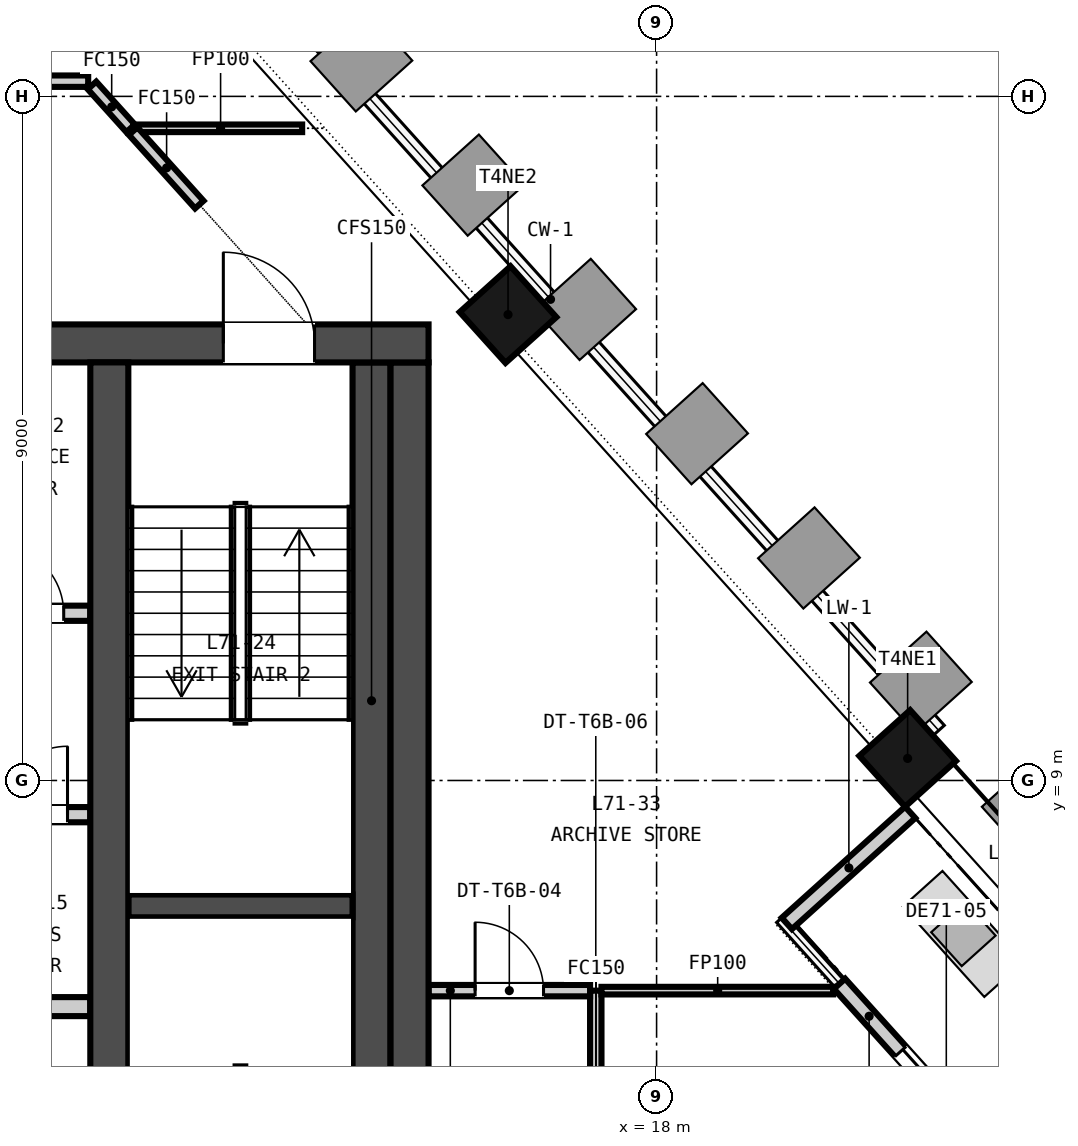
"""IFC4 building model, lengths in metres.
Left out: names, types, materials, properties, quantities, classifications, styles, units other than length and angle.
Written with IfcOpenShell. Run it as: python <this file> out.ifc"""

import sys

from ifc_helpers import new_model, si_unit, direction, frame, frame_2d, origin, origin_2d, place, context, subcontext, project, spatial, rectangle, extrude, element, fill, save


model = new_model("IFC4")
c1 = context("Model", 3, precision=1e-05, world=origin(), true_north=direction((0.0, 1.0)))
c2 = subcontext(c1, "Body", "Model", "MODEL_VIEW")
j1 = project(units=[si_unit("LENGTHUNIT", "METRE"), si_unit("PLANEANGLEUNIT", "RADIAN")], contexts=[c1])
p1 = place(None, origin())
s1 = spatial("IfcSite", under=j1, at=p1, CompositionType="ELEMENT")
p2 = place(p1, origin())
s2 = spatial("IfcBuilding", under=s1, at=p2, CompositionType="ELEMENT")
p3 = place(p2, frame((0.0, 0.0, 279.2)))
s3 = spatial("IfcBuildingStorey", under=s2, at=p3, CompositionType="ELEMENT", Elevation=279.2)
p4 = place(p3, frame((-15.0, 14.75, -0.15), z_axis=(0.0, 0.0, 1.0), x_axis=(1.0, 0.0, 0.0)))
e1 = element("IfcWall", 1, at=p4, inside=s3, PredefinedType="SOLIDWALL", context=c2, shape_type="SweptSolid", body=[
    extrude(rectangle(XDim=30.0, YDim=0.5, at=frame_2d((15.0, 0.0))), origin(), (0.0, 0.0, 1.0), 3.65),
])
p5 = place(p4, frame((9.25, 0.0, 0.15)))
e2 = element("IfcOpeningElement", 2, at=p5, cuts=e1, PredefinedType="OPENING", context=c2, shape_type="SweptSolid", body=[
    extrude(rectangle(XDim=1.5, YDim=2.1, at=frame_2d((0.75, 1.05))), frame((0.0, 0.26, 0.0), z_axis=(0.0, -1.0, 0.0), x_axis=(1.0, 0.0, 0.0)), (0.0, 0.0, 1.0), 0.52),
])
p6 = place(p4, frame((19.4, 0.0, 0.15)))
e3 = element("IfcOpeningElement", 3, at=p6, cuts=e1, PredefinedType="OPENING", context=c2, shape_type="SweptSolid", body=[
    extrude(rectangle(XDim=1.5, YDim=2.1, at=frame_2d((0.75, 1.05))), frame((0.0, 0.26, 0.0), z_axis=(0.0, -1.0, 0.0), x_axis=(1.0, 0.0, 0.0)), (0.0, 0.0, 1.0), 0.52),
])
p7 = place(p4, frame((1.5, 0.0, 0.15)))
e4 = element("IfcOpeningElement", 4, at=p7, cuts=e1, PredefinedType="OPENING", context=c2, shape_type="SweptSolid", body=[
    extrude(rectangle(XDim=1.2, YDim=2.1, at=frame_2d((0.6, 1.05))), frame((0.0, 0.26, 0.0), z_axis=(0.0, -1.0, 0.0), x_axis=(1.0, 0.0, 0.0)), (0.0, 0.0, 1.0), 0.52),
])
p8 = place(p4, frame((27.3, 0.0, 0.15)))
e5 = element("IfcOpeningElement", 5, at=p8, cuts=e1, PredefinedType="OPENING", context=c2, shape_type="SweptSolid", body=[
    extrude(rectangle(XDim=1.2, YDim=2.1, at=frame_2d((0.6, 1.05))), frame((0.0, 0.26, 0.0), z_axis=(0.0, -1.0, 0.0), x_axis=(1.0, 0.0, 0.0)), (0.0, 0.0, 1.0), 0.52),
])
for number, where, z_axis, x_axis in (
    (6, (14.75, 0.5, -0.15), (0.0, 0.0, 1.0), (0.0, 1.0, 0.0)),
    (7, (10.8, 0.5, -0.15), (0.0, 0.0, 1.0), (0.0, 1.0, 0.0)),
):
    element("IfcWall", number, at=place(p3, frame(where, z_axis=z_axis, x_axis=x_axis)), inside=s3, PredefinedType="SOLIDWALL", context=c2, shape_type="SweptSolid", body=[
        extrude(rectangle(XDim=14.0, YDim=0.5, at=frame_2d((7.0, 0.0))), origin(), (0.0, 0.0, 1.0), 3.65),
    ])
for number, where, z_axis, x_axis in (
    (8, (21.303, 9.29, -0.15), (0.0, 0.0, 1.0), (-0.669, 0.743, 0.0)),
    (9, (16.045, 15.129, -0.15), (0.0, 0.0, 1.0), (-0.669, 0.743, 0.0)),
):
    element("IfcColumn", number, at=place(p3, frame(where, z_axis=z_axis, x_axis=x_axis)), inside=s3, PredefinedType="COLUMN", context=c2, shape_type="SweptSolid", body=[
        extrude(rectangle(XDim=0.9, YDim=0.9, at=origin_2d()), origin(), (0.0, 0.0, 1.0), 3.65),
    ])
p9 = place(p3, frame((23.217, 3.204, 0.0), z_axis=(0.0, 0.0, 1.0), x_axis=(-0.669138140895, 0.743138041282, 0.0)))
e10 = element("IfcWall", 10, at=p9, inside=s3, PredefinedType="SOLIDWALL", context=c2, shape_type="SweptSolid", body=[
    extrude(rectangle(XDim=4.2, YDim=0.2, at=frame_2d((2.1, 0.0))), origin(), (0.0, 0.0, 1.0), 3.05),
])
p10 = place(p9, frame((1.2, 0.0, 0.0)))
e11 = element("IfcOpeningElement", 11, at=p10, cuts=e10, PredefinedType="OPENING", context=c2, shape_type="SweptSolid", body=[
    extrude(rectangle(XDim=1.8, YDim=2.4, at=frame_2d((0.9, 1.2))), frame((0.0, 0.11, 0.0), z_axis=(0.0, -1.0, 0.0), x_axis=(1.0, 0.0, 0.0)), (0.0, 0.0, 1.0), 0.22),
])
p11 = place(p3, frame((21.336, 8.58, 0.0), z_axis=(0.0, 0.0, 1.0), x_axis=(-0.743138493482, -0.669137638686, 0.0)))
e12 = element("IfcWall", 12, at=p11, inside=s3, PredefinedType="SOLIDWALL", context=c2, shape_type="SweptSolid", body=[
    extrude(rectangle(XDim=2.184, YDim=0.2, at=frame_2d((1.092, 0.0))), origin(), (0.0, 0.0, 1.0), 3.05),
])
p12 = place(p3, frame((-10.55, 6.025, 0.0), z_axis=(0.0, 0.0, 1.0), x_axis=(1.0, 0.0, 0.0)))
e13 = element("IfcWall", 13, at=p12, inside=s3, PredefinedType="PARTITIONING", context=c2, shape_type="SweptSolid", body=[
    extrude(rectangle(XDim=21.1, YDim=0.25, at=frame_2d((10.55, 0.0))), origin(), (0.0, 0.0, 1.0), 3.5),
])
p13 = place(p3, frame((-4.125, 8.55, 0.0), z_axis=(0.0, 0.0, 1.0), x_axis=(1.0, 0.0, 0.0)))
e14 = element("IfcWall", 14, at=p13, inside=s3, PredefinedType="PARTITIONING", context=c2, shape_type="SweptSolid", body=[
    extrude(rectangle(XDim=14.675, YDim=0.2, at=frame_2d((7.337, 0.0))), origin(), (0.0, 0.0, 1.0), 3.5),
])
p14 = place(p13, frame((2.438, 0.0, 0.0)))
e15 = element("IfcOpeningElement", 15, at=p14, cuts=e14, PredefinedType="OPENING", context=c2, shape_type="SweptSolid", body=[
    extrude(rectangle(XDim=1.0, YDim=2.1, at=frame_2d((0.5, 1.05))), frame((0.0, 0.11, 0.0), z_axis=(0.0, -1.0, 0.0), x_axis=(1.0, 0.0, 0.0)), (0.0, 0.0, 1.0), 0.22),
])
p15 = place(p13, frame((6.775, 0.0, 0.0)))
e16 = element("IfcOpeningElement", 16, at=p15, cuts=e14, PredefinedType="OPENING", context=c2, shape_type="SweptSolid", body=[
    extrude(rectangle(XDim=1.0, YDim=2.1, at=frame_2d((0.5, 1.05))), frame((0.0, 0.11, 0.0), z_axis=(0.0, -1.0, 0.0), x_axis=(1.0, 0.0, 0.0)), (0.0, 0.0, 1.0), 0.22),
])
p16 = place(p13, frame((10.363, 0.0, 0.0)))
e17 = element("IfcOpeningElement", 17, at=p16, cuts=e14, PredefinedType="OPENING", context=c2, shape_type="SweptSolid", body=[
    extrude(rectangle(XDim=1.0, YDim=2.1, at=frame_2d((0.5, 1.05))), frame((0.0, 0.11, 0.0), z_axis=(0.0, -1.0, 0.0), x_axis=(1.0, 0.0, 0.0)), (0.0, 0.0, 1.0), 0.22),
])
p17 = place(p13, frame((13.475, 0.0, 0.0)))
e18 = element("IfcOpeningElement", 18, at=p17, cuts=e14, PredefinedType="OPENING", context=c2, shape_type="SweptSolid", body=[
    extrude(rectangle(XDim=0.9, YDim=2.1, at=frame_2d((0.45, 1.05))), frame((0.0, 0.11, 0.0), z_axis=(0.0, -1.0, 0.0), x_axis=(1.0, 0.0, 0.0)), (0.0, 0.0, 1.0), 0.22),
])
p18 = place(p3, frame((5.9, 11.2, 0.0), z_axis=(0.0, 0.0, 1.0), x_axis=(1.0, 0.0, 0.0)))
e19 = element("IfcWall", 19, at=p18, inside=s3, PredefinedType="PARTITIONING", context=c2, shape_type="SweptSolid", body=[
    extrude(rectangle(XDim=4.65, YDim=0.2, at=frame_2d((2.325, 0.0))), origin(), (0.0, 0.0, 1.0), 3.5),
])
p19 = place(p18, frame((1.075, 0.0, 0.0)))
e20 = element("IfcOpeningElement", 20, at=p19, cuts=e19, PredefinedType="OPENING", context=c2, shape_type="SweptSolid", body=[
    extrude(rectangle(XDim=0.9, YDim=2.1, at=frame_2d((0.45, 1.05))), frame((0.0, 0.11, 0.0), z_axis=(0.0, -1.0, 0.0), x_axis=(1.0, 0.0, 0.0)), (0.0, 0.0, 1.0), 0.22),
])
p20 = place(p18, frame((3.4, 0.0, 0.0)))
e21 = element("IfcOpeningElement", 21, at=p20, cuts=e19, PredefinedType="OPENING", context=c2, shape_type="SweptSolid", body=[
    extrude(rectangle(XDim=0.9, YDim=2.1, at=frame_2d((0.45, 1.05))), frame((0.0, 0.11, 0.0), z_axis=(0.0, -1.0, 0.0), x_axis=(1.0, 0.0, 0.0)), (0.0, 0.0, 1.0), 0.22),
])
p21 = place(p3, frame((11.05, 7.35, 0.0), z_axis=(0.0, 0.0, 1.0), x_axis=(1.0, 0.0, 0.0)))
e22 = element("IfcWall", 22, at=p21, inside=s3, PredefinedType="SOLIDWALL", context=c2, shape_type="SweptSolid", body=[
    extrude(rectangle(XDim=2.95, YDim=0.3, at=frame_2d((1.475, 0.0))), origin(), (0.0, 0.0, 1.0), 3.5),
])
p22 = place(p3, frame((14.25, 0.5, 0.0), z_axis=(0.0, 0.0, 1.0), x_axis=(0.0, 1.0, 0.0)))
e23 = element("IfcWall", 23, at=p22, inside=s3, PredefinedType="SOLIDWALL", context=c2, shape_type="SweptSolid", body=[
    extrude(rectangle(XDim=14.0, YDim=0.5, at=frame_2d((7.0, 0.0))), origin(), (0.0, 0.0, 1.0), 3.5),
])
p23 = place(p3, frame((17.2, 6.235, 0.0), z_axis=(0.0, 0.0, 1.0), x_axis=(0.0, -1.0, 0.0)))
e24 = element("IfcWall", 24, at=p23, inside=s3, PredefinedType="PARTITIONING", context=c2, shape_type="SweptSolid", body=[
    extrude(rectangle(XDim=9.96, YDim=0.15, at=frame_2d((4.98, 0.0))), origin(), (0.0, 0.0, 1.0), 2.751),
])
p24 = place(p23, frame((4.48, 0.0, 0.0)))
e25 = element("IfcOpeningElement", 25, at=p24, cuts=e24, PredefinedType="OPENING", context=c2, shape_type="SweptSolid", body=[
    extrude(rectangle(XDim=1.0, YDim=2.1, at=frame_2d((0.5, 1.05))), frame((0.0, 0.085, 0.0), z_axis=(0.0, -1.0, 0.0), x_axis=(1.0, 0.0, 0.0)), (0.0, 0.0, 1.0), 0.17),
])
p25 = place(p3, frame((4.675, 18.2, 0.0), z_axis=(0.0, 0.0, 1.0), x_axis=(1.0, 0.0, 0.0)))
e26 = element("IfcWall", 26, at=p25, inside=s3, PredefinedType="PARTITIONING", context=c2, shape_type="SweptSolid", body=[
    extrude(rectangle(XDim=5.847, YDim=0.15, at=frame_2d((2.923, 0.0))), origin(), (0.0, 0.0, 1.0), 2.751),
])
p26 = place(p25, frame((2.424, 0.0, 0.0)))
e27 = element("IfcOpeningElement", 27, at=p26, cuts=e26, PredefinedType="OPENING", context=c2, shape_type="SweptSolid", body=[
    extrude(rectangle(XDim=1.0, YDim=2.1, at=frame_2d((0.5, 1.05))), frame((0.0, 0.085, 0.0), z_axis=(0.0, -1.0, 0.0), x_axis=(1.0, 0.0, 0.0)), (0.0, 0.0, 1.0), 0.17),
])
p27 = place(p3, frame((10.572, 18.144, 0.0), z_axis=(0.0, 0.0, 1.0), x_axis=(0.668982500835, -0.743278153572, 0.0)))
e28 = element("IfcWall", 28, at=p27, inside=s3, PredefinedType="PARTITIONING", context=c2, shape_type="SweptSolid", body=[
    extrude(rectangle(XDim=0.759, YDim=0.15, at=frame_2d((0.379, 0.0))), origin(), (0.0, 0.0, 1.0), 2.751),
])
p28 = place(p3, frame((11.181, 17.58, 0.0), z_axis=(0.0, 0.0, 1.0), x_axis=(1.0, 0.0, 0.0)))
e29 = element("IfcWall", 29, at=p28, inside=s3, PredefinedType="PARTITIONING", context=c2, shape_type="SweptSolid", body=[
    extrude(rectangle(XDim=2.156, YDim=0.1, at=frame_2d((1.078, 0.0))), origin(), (0.0, 0.0, 1.0), 2.751),
])
p29 = place(p3, frame((11.114, 17.543, 0.0), z_axis=(0.0, 0.0, 1.0), x_axis=(0.66906841405, -0.743200818972, 0.0)))
e30 = element("IfcWall", 30, at=p29, inside=s3, PredefinedType="PARTITIONING", context=c2, shape_type="SweptSolid", body=[
    extrude(rectangle(XDim=1.301, YDim=0.15, at=frame_2d((0.65, 0.0))), origin(), (0.0, 0.0, 1.0), 2.751),
])
p30 = place(p3, frame((15.0, 6.235, 0.0), z_axis=(0.0, 0.0, 1.0), x_axis=(1.0, 0.0, 0.0)))
e31 = element("IfcWall", 31, at=p30, inside=s3, PredefinedType="PARTITIONING", context=c2, shape_type="SweptSolid", body=[
    extrude(rectangle(XDim=2.125, YDim=0.15, at=frame_2d((1.062, 0.0))), origin(), (0.0, 0.0, 1.0), 2.751),
])
p31 = place(p30, frame((0.613, 0.0, 0.0)))
e32 = element("IfcOpeningElement", 32, at=p31, cuts=e31, PredefinedType="OPENING", context=c2, shape_type="SweptSolid", body=[
    extrude(rectangle(XDim=0.9, YDim=2.1, at=frame_2d((0.45, 1.05))), frame((0.0, 0.085, 0.0), z_axis=(0.0, -1.0, 0.0), x_axis=(1.0, 0.0, 0.0)), (0.0, 0.0, 1.0), 0.17),
])
p32 = place(p3, frame((17.275, 6.235, 0.0), z_axis=(0.0, 0.0, 1.0), x_axis=(0.999999971117, 0.000240346091, 0.0)))
e33 = element("IfcWall", 33, at=p32, inside=s3, PredefinedType="PARTITIONING", context=c2, shape_type="SweptSolid", body=[
    extrude(rectangle(XDim=3.047, YDim=0.1, at=frame_2d((1.524, 0.0))), origin(), (0.0, 0.0, 1.0), 2.751),
])
p33 = place(p10, origin())
e34 = element("IfcDoor", 34, at=p33, inside=s3, OperationType="SINGLE_SWING_LEFT", PredefinedType="DOOR", context=c2, shape_type="SweptSolid", body=[
    extrude(rectangle(XDim=1.8, YDim=2.4, at=frame_2d((0.9, 1.2))), frame((0.0, 0.025, 0.0), z_axis=(0.0, -1.0, 0.0), x_axis=(1.0, 0.0, 0.0)), (0.0, 0.0, 1.0), 0.05),
])
fill(e11, e34)
p34 = place(p17, origin())
e35 = element("IfcDoor", 35, at=p34, inside=s3, OperationType="SINGLE_SWING_RIGHT", PredefinedType="DOOR", context=c2, shape_type="SweptSolid", body=[
    extrude(rectangle(XDim=0.9, YDim=2.1, at=frame_2d((0.45, 1.05))), frame((0.0, 0.025, 0.0), z_axis=(0.0, -1.0, 0.0), x_axis=(1.0, 0.0, 0.0)), (0.0, 0.0, 1.0), 0.05),
])
fill(e18, e35)
p35 = place(p20, origin())
e36 = element("IfcDoor", 36, at=p35, inside=s3, OperationType="SINGLE_SWING_LEFT", PredefinedType="DOOR", context=c2, shape_type="SweptSolid", body=[
    extrude(rectangle(XDim=0.9, YDim=2.1, at=frame_2d((0.45, 1.05))), frame((0.0, 0.025, 0.0), z_axis=(0.0, -1.0, 0.0), x_axis=(1.0, 0.0, 0.0)), (0.0, 0.0, 1.0), 0.05),
])
fill(e21, e36)
p36 = place(p8, origin())
e37 = element("IfcDoor", 37, at=p36, inside=s3, OperationType="SINGLE_SWING_LEFT", PredefinedType="DOOR", context=c2, shape_type="SweptSolid", body=[
    extrude(rectangle(XDim=1.2, YDim=2.1, at=frame_2d((0.6, 1.05))), frame((0.0, 0.025, 0.0), z_axis=(0.0, -1.0, 0.0), x_axis=(1.0, 0.0, 0.0)), (0.0, 0.0, 1.0), 0.05),
])
fill(e5, e37)
p37 = place(p31, origin())
e38 = element("IfcDoor", 38, at=p37, inside=s3, OperationType="SINGLE_SWING_LEFT", PredefinedType="DOOR", context=c2, shape_type="SweptSolid", body=[
    extrude(rectangle(XDim=0.9, YDim=2.1, at=frame_2d((0.45, 1.05))), frame((0.0, 0.025, 0.0), z_axis=(0.0, -1.0, 0.0), x_axis=(1.0, 0.0, 0.0)), (0.0, 0.0, 1.0), 0.05),
])
fill(e32, e38)
save(model, sys.argv[1])
